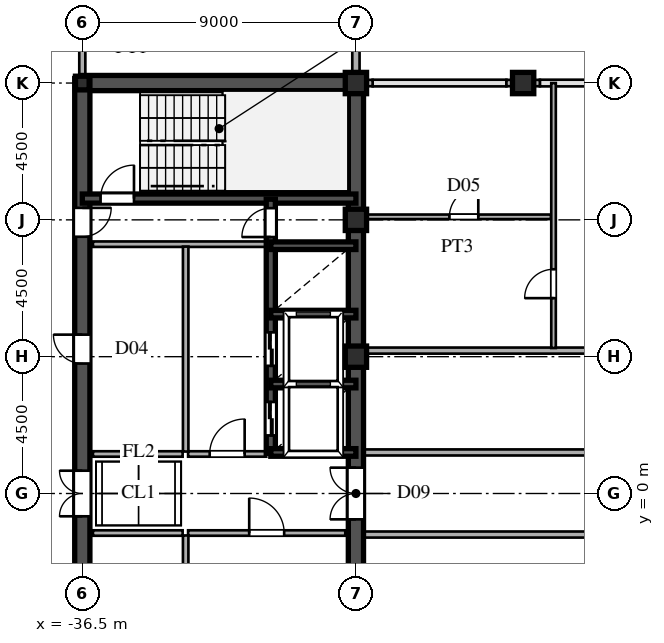
"""IFC4 building model, lengths in metres.
Left out: names, types, materials, properties, quantities, classifications, styles, units other than length and angle.
Written with IfcOpenShell. Run it as: python <this file> out.ifc"""

import sys

from ifc_helpers import new_model, si_unit, direction, frame, frame_2d, origin, origin_2d, place, context, subcontext, project, spatial, rectangle, hollow_rectangle, i_section, extrude, source, transform, mapped, element, fill, save


model = new_model("IFC4")
c1 = context("Model", 3, precision=1e-05, world=origin(), true_north=direction((0.0, 1.0)))
c2 = subcontext(c1, "Body", "Model", "MODEL_VIEW")
j1 = project(units=[si_unit("LENGTHUNIT", "METRE"), si_unit("PLANEANGLEUNIT", "RADIAN")], contexts=[c1])
p1 = place(None, origin())
s1 = spatial("IfcSite", under=j1, at=p1, CompositionType="ELEMENT")
p2 = place(p1, origin())
s2 = spatial("IfcBuilding", under=s1, at=p2, CompositionType="ELEMENT")
p3 = place(p2, frame((0.0, 0.0, 265.65)))
s3 = spatial("IfcBuildingStorey", under=s2, at=p3, CompositionType="ELEMENT", Elevation=265.65)
m1 = source(origin(), c2, "Body", "SweptSolid", [
    extrude(hollow_rectangle(XDim=0.7, YDim=0.7, WallThickness=0.03, at=origin_2d()), origin(), (0.0, 0.0, 1.0), 3.75),
])
for number, where, z_axis, x_axis in (
    (1, (-27.5, 4.5, 0.0), (0.0, 0.0, 1.0), (1.0, 0.0, 0.0)),
    (2, (-27.5, 9.0, 0.0), (0.0, 0.0, 1.0), (1.0, 0.0, 0.0)),
    (3, (-27.5, 13.5, 0.0), (0.0, 0.0, 1.0), (1.0, 0.0, 0.0)),
):
    element("IfcColumn", number, at=place(p3, frame(where, z_axis=z_axis, x_axis=x_axis)), inside=s3, PredefinedType="COLUMN", context=c2, shape_type="MappedRepresentation", body=[
        mapped(m1, transform((0.0, 0.0, 0.0), scale=1.0)),
    ])
m2 = source(origin(), c2, "Body", "SweptSolid", [
    extrude(i_section(OverallWidth=0.45, OverallDepth=0.45, WebThickness=0.016, FlangeThickness=0.025, at=origin_2d()), origin(), (0.0, 0.0, 1.0), 3.75),
])
p4 = place(p3, frame((-36.5, 13.5, 0.0), z_axis=(0.0, 0.0, 1.0), x_axis=(1.0, 0.0, 0.0)))
e4 = element("IfcColumn", 4, at=p4, inside=s3, PredefinedType="COLUMN", context=c2, shape_type="MappedRepresentation", body=[
    mapped(m2, transform((0.0, 0.0, 0.0), scale=1.0)),
])
p5 = place(p3, frame((-22.0, 13.5, 0.0), z_axis=(0.0, 0.0, 1.0), x_axis=(1.0, 0.0, 0.0)))
e5 = element("IfcColumn", 5, at=p5, inside=s3, PredefinedType="COLUMN", context=c2, shape_type="MappedRepresentation", body=[
    mapped(m1, transform((0.0, 0.0, 0.0), scale=1.0)),
])
p6 = place(p3, frame((-27.5, 13.755, 0.0), z_axis=(0.0, 0.0, 1.0), x_axis=(0.0, 1.0, 0.0)))
e6 = element("IfcWall", 6, at=p6, inside=s3, PredefinedType="SOLIDWALL", context=c2, shape_type="SweptSolid", body=[
    extrude(rectangle(XDim=0.62, YDim=0.24, at=frame_2d((0.31, 0.0))), origin(), (0.0, 0.0, 1.0), 2.99),
])
p7 = place(p3, frame((-27.5, 14.375, 0.0), z_axis=(0.0, 0.0, 1.0), x_axis=(0.0, 1.0, 0.0)))
e7 = element("IfcWall", 7, at=p7, inside=s3, PredefinedType="SOLIDWALL", context=c2, shape_type="SweptSolid", body=[
    extrude(rectangle(XDim=1.605, YDim=0.24, at=frame_2d((0.803, 0.0))), origin(), (0.0, 0.0, 1.0), 3.49),
])
p8 = place(p3, frame((-27.49, 13.5, 0.0), z_axis=(0.0, 0.0, 1.0), x_axis=(1.0, 0.0, 0.0)))
e8 = element("IfcWall", 8, at=p8, inside=s3, PredefinedType="SOLIDWALL", context=c2, shape_type="SweptSolid", body=[
    extrude(rectangle(XDim=0.54, YDim=0.21, at=frame_2d((0.27, 0.0))), origin(), (0.0, 0.0, 1.0), 2.99),
])
p9 = place(p3, frame((-22.55, 13.5, 0.0), z_axis=(0.0, 0.0, 1.0), x_axis=(1.0, 0.0, 0.0)))
e9 = element("IfcWall", 9, at=p9, inside=s3, PredefinedType="SOLIDWALL", context=c2, shape_type="SweptSolid", body=[
    extrude(rectangle(XDim=1.1, YDim=0.21, at=frame_2d((0.55, 0.0))), origin(), (0.0, 0.0, 1.0), 2.99),
])
for number, where, z_axis, x_axis in (
    (10, (-27.5, -13.5, 0.0), (0.0, 0.0, 1.0), (0.0, 1.0, 0.0)),
    (11, (-27.5, 1.3, 0.0), (0.0, 0.0, 1.0), (0.0, 1.0, 0.0)),
):
    element("IfcWall", number, at=place(p3, frame(where, z_axis=z_axis, x_axis=x_axis)), inside=s3, PredefinedType="SHEAR", context=c2, shape_type="SweptSolid", body=[
        extrude(rectangle(XDim=12.2, YDim=0.5, at=frame_2d((6.1, 0.0))), origin(), (0.0, 0.0, 1.0), 3.49),
    ])
p10 = place(p3, frame((-27.5, -1.3, 0.0), z_axis=(0.0, 0.0, 1.0), x_axis=(0.0, 1.0, 0.0)))
e12 = element("IfcWall", 12, at=p10, inside=s3, PredefinedType="SHEAR", context=c2, shape_type="SweptSolid", body=[
    extrude(rectangle(XDim=2.6, YDim=0.5, at=frame_2d((1.3, 0.0))), origin(), (0.0, 0.0, 1.0), 3.49),
])
p11 = place(p10, frame((0.45, 0.0, 0.0)))
e13 = element("IfcOpeningElement", 13, at=p11, cuts=e12, PredefinedType="OPENING", context=c2, shape_type="SweptSolid", body=[
    extrude(rectangle(XDim=1.7, YDim=2.35, at=frame_2d((0.85, 1.175))), frame((0.0, 0.26, 0.0), z_axis=(0.0, -1.0, 0.0), x_axis=(1.0, 0.0, 0.0)), (0.0, 0.0, 1.0), 0.52),
])
p12 = place(p3, frame((-36.5, 13.5, 0.0), z_axis=(0.0, 0.0, 1.0), x_axis=(1.0, 0.0, 0.0)))
e14 = element("IfcWall", 14, at=p12, inside=s3, PredefinedType="SHEAR", context=c2, shape_type="SweptSolid", body=[
    extrude(rectangle(XDim=9.0, YDim=0.5, at=frame_2d((4.5, 0.0))), origin(), (0.0, 0.0, 1.0), 3.49),
])
p13 = place(p3, frame((-36.5, -1.3, 0.0), z_axis=(0.0, 0.0, 1.0), x_axis=(0.0, 1.0, 0.0)))
e15 = element("IfcWall", 15, at=p13, inside=s3, PredefinedType="SHEAR", context=c2, shape_type="SweptSolid", body=[
    extrude(rectangle(XDim=2.6, YDim=0.5, at=frame_2d((1.3, 0.0))), origin(), (0.0, 0.0, 1.0), 3.49),
])
p14 = place(p13, frame((0.55, 0.0, 0.0)))
e16 = element("IfcOpeningElement", 16, at=p14, cuts=e15, PredefinedType="OPENING", context=c2, shape_type="SweptSolid", body=[
    extrude(rectangle(XDim=1.5, YDim=2.3, at=frame_2d((0.75, 1.15))), frame((0.0, 0.26, 0.0), z_axis=(0.0, -1.0, 0.0), x_axis=(1.0, 0.0, 0.0)), (0.0, 0.0, 1.0), 0.52),
])
p15 = place(p3, frame((-36.5, 8.2, 0.0), z_axis=(0.0, 0.0, 1.0), x_axis=(0.0, 1.0, 0.0)))
e17 = element("IfcWall", 17, at=p15, inside=s3, PredefinedType="SHEAR", context=c2, shape_type="SweptSolid", body=[
    extrude(rectangle(XDim=5.45, YDim=0.5, at=frame_2d((2.725, 0.0))), origin(), (0.0, 0.0, 1.0), 3.49),
])
p16 = place(p15, frame((0.245, 0.0, 0.0)))
e18 = element("IfcOpeningElement", 18, at=p16, cuts=e17, PredefinedType="OPENING", context=c2, shape_type="SweptSolid", body=[
    extrude(rectangle(XDim=0.95, YDim=2.15, at=frame_2d((0.475, 1.075))), frame((0.0, 0.26, 0.0), z_axis=(0.0, -1.0, 0.0), x_axis=(1.0, 0.0, 0.0)), (0.0, 0.0, 1.0), 0.52),
])
p17 = place(p3, frame((-36.5, -6.5, 0.0), z_axis=(0.0, 0.0, 1.0), x_axis=(0.0, 1.0, 0.0)))
e19 = element("IfcWall", 19, at=p17, inside=s3, PredefinedType="SHEAR", context=c2, shape_type="SweptSolid", body=[
    extrude(rectangle(XDim=5.2, YDim=0.5, at=frame_2d((2.6, 0.0))), origin(), (0.0, 0.0, 1.0), 3.49),
])
p18 = place(p17, frame((2.125, 0.0, 0.0)))
e20 = element("IfcOpeningElement", 20, at=p18, cuts=e19, PredefinedType="OPENING", context=c2, shape_type="SweptSolid", body=[
    extrude(rectangle(XDim=0.95, YDim=2.15, at=frame_2d((0.475, 1.075))), frame((0.0, 0.26, 0.0), z_axis=(0.0, -1.0, 0.0), x_axis=(1.0, 0.0, 0.0)), (0.0, 0.0, 1.0), 0.52),
])
p19 = place(p3, frame((-36.5, 1.3, 0.0), z_axis=(0.0, 0.0, 1.0), x_axis=(0.0, 1.0, 0.0)))
e21 = element("IfcWall", 21, at=p19, inside=s3, PredefinedType="SHEAR", context=c2, shape_type="SweptSolid", body=[
    extrude(rectangle(XDim=6.9, YDim=0.5, at=frame_2d((3.45, 0.0))), origin(), (0.0, 0.0, 1.0), 3.49),
])
p20 = place(p19, frame((2.975, 0.0, 0.0)))
e22 = element("IfcOpeningElement", 22, at=p20, cuts=e21, PredefinedType="OPENING", context=c2, shape_type="SweptSolid", body=[
    extrude(rectangle(XDim=0.95, YDim=2.15, at=frame_2d((0.475, 1.075))), frame((0.0, 0.26, 0.0), z_axis=(0.0, -1.0, 0.0), x_axis=(1.0, 0.0, 0.0)), (0.0, 0.0, 1.0), 0.52),
])
p21 = place(p3, frame((-36.5, 9.7, 0.0), z_axis=(0.0, 0.0, 1.0), x_axis=(1.0, 0.0, 0.0)))
e23 = element("IfcWall", 23, at=p21, inside=s3, PredefinedType="SHEAR", context=c2, shape_type="SweptSolid", body=[
    extrude(rectangle(XDim=9.0, YDim=0.3, at=frame_2d((4.5, 0.0))), origin(), (0.0, 0.0, 1.0), 3.49),
])
p22 = place(p21, frame((0.6, 0.0, 0.0)))
e24 = element("IfcOpeningElement", 24, at=p22, cuts=e23, PredefinedType="OPENING", context=c2, shape_type="SweptSolid", body=[
    extrude(rectangle(XDim=1.1, YDim=2.2, at=frame_2d((0.55, 1.1))), frame((0.0, 0.16, 0.0), z_axis=(0.0, -1.0, 0.0), x_axis=(1.0, 0.0, 0.0)), (0.0, 0.0, 1.0), 0.32),
])
for number, where, z_axis, x_axis in (
    (25, (-30.3, 1.35, 0.0), (0.0, 0.0, 1.0), (1.0, 0.0, 0.0)),
    (26, (-30.3, 3.6, 0.0), (0.0, 0.0, 1.0), (1.0, 0.0, 0.0)),
    (27, (-30.3, 5.9, 0.0), (0.0, 0.0, 1.0), (1.0, 0.0, 0.0)),
    (28, (-30.3, 8.15, 0.0), (0.0, 0.0, 1.0), (1.0, 0.0, 0.0)),
):
    element("IfcWall", number, at=place(p3, frame(where, z_axis=z_axis, x_axis=x_axis)), inside=s3, PredefinedType="SHEAR", context=c2, shape_type="SweptSolid", body=[
        extrude(rectangle(XDim=2.8, YDim=0.25, at=frame_2d((1.4, 0.0))), origin(), (0.0, 0.0, 1.0), 3.49),
    ])
p23 = place(p3, frame((-30.3, 1.32, 0.0), z_axis=(0.0, 0.0, 1.0), x_axis=(0.0, 1.0, 0.0)))
e29 = element("IfcWall", 29, at=p23, inside=s3, PredefinedType="SHEAR", context=c2, shape_type="SweptSolid", body=[
    extrude(rectangle(XDim=2.28, YDim=0.3, at=frame_2d((1.14, 0.0))), origin(), (0.0, 0.0, 1.0), 3.49),
])
p24 = place(p23, frame((0.59, 0.0, 0.0)))
e30 = element("IfcOpeningElement", 30, at=p24, cuts=e29, PredefinedType="OPENING", context=c2, shape_type="SweptSolid", body=[
    extrude(rectangle(XDim=1.1, YDim=2.2, at=frame_2d((0.55, 1.1))), frame((0.0, 0.16, 0.0), z_axis=(0.0, -1.0, 0.0), x_axis=(1.0, 0.0, 0.0)), (0.0, 0.0, 1.0), 0.32),
])
p25 = place(p3, frame((-30.3, 3.6, 0.0), z_axis=(0.0, 0.0, 1.0), x_axis=(0.0, 1.0, 0.0)))
e31 = element("IfcWall", 31, at=p25, inside=s3, PredefinedType="SHEAR", context=c2, shape_type="SweptSolid", body=[
    extrude(rectangle(XDim=2.3, YDim=0.3, at=frame_2d((1.15, 0.0))), origin(), (0.0, 0.0, 1.0), 3.49),
])
p26 = place(p25, frame((0.6, 0.0, 0.0)))
e32 = element("IfcOpeningElement", 32, at=p26, cuts=e31, PredefinedType="OPENING", context=c2, shape_type="SweptSolid", body=[
    extrude(rectangle(XDim=1.1, YDim=2.2, at=frame_2d((0.55, 1.1))), frame((0.0, 0.16, 0.0), z_axis=(0.0, -1.0, 0.0), x_axis=(1.0, 0.0, 0.0)), (0.0, 0.0, 1.0), 0.32),
])
p27 = place(p3, frame((-30.3, 5.9, 0.0), z_axis=(0.0, 0.0, 1.0), x_axis=(0.0, 1.0, 0.0)))
e33 = element("IfcWall", 33, at=p27, inside=s3, PredefinedType="SHEAR", context=c2, shape_type="SweptSolid", body=[
    extrude(rectangle(XDim=2.25, YDim=0.3, at=frame_2d((1.125, 0.0))), origin(), (0.0, 0.0, 1.0), 3.49),
])
p28 = place(p3, frame((-30.3, 8.15, 0.0), z_axis=(0.0, 0.0, 1.0), x_axis=(0.0, 1.0, 0.0)))
e34 = element("IfcWall", 34, at=p28, inside=s3, PredefinedType="SHEAR", context=c2, shape_type="SweptSolid", body=[
    extrude(rectangle(XDim=1.53, YDim=0.3, at=frame_2d((0.765, 0.0))), origin(), (0.0, 0.0, 1.0), 3.49),
])
p29 = place(p28, frame((0.285, 0.0, 0.0)))
e35 = element("IfcOpeningElement", 35, at=p29, cuts=e34, PredefinedType="OPENING", context=c2, shape_type="SweptSolid", body=[
    extrude(rectangle(XDim=0.95, YDim=2.15, at=frame_2d((0.475, 1.075))), frame((0.0, 0.16, 0.0), z_axis=(0.0, -1.0, 0.0), x_axis=(1.0, 0.0, 0.0)), (0.0, 0.0, 1.0), 0.32),
])
p30 = place(p3, frame((-36.15, 8.2, 0.0), z_axis=(0.0, 0.0, 1.0), x_axis=(1.0, 0.0, 0.0)))
e36 = element("IfcWall", 36, at=p30, inside=s3, PredefinedType="PARTITIONING", context=c2, shape_type="SweptSolid", body=[
    extrude(rectangle(XDim=5.7, YDim=0.18, at=frame_2d((2.85, 0.0))), origin(), (0.0, 0.0, 1.0), 3.49),
])
p31 = place(p3, frame((-33.1, -6.42, 0.0), z_axis=(0.0, 0.0, 1.0), x_axis=(0.0, 1.0, 0.0)))
e37 = element("IfcWall", 37, at=p31, inside=s3, PredefinedType="PARTITIONING", context=c2, shape_type="SweptSolid", body=[
    extrude(rectangle(XDim=5.04, YDim=0.18, at=frame_2d((2.52, 0.0))), origin(), (0.0, 0.0, 1.0), 3.49),
])
p32 = place(p3, frame((-33.1, 1.38, 0.0), z_axis=(0.0, 0.0, 1.0), x_axis=(0.0, 1.0, 0.0)))
e38 = element("IfcWall", 38, at=p32, inside=s3, PredefinedType="PARTITIONING", context=c2, shape_type="SweptSolid", body=[
    extrude(rectangle(XDim=6.74, YDim=0.18, at=frame_2d((3.37, 0.0))), origin(), (0.0, 0.0, 1.0), 3.49),
])
p33 = place(p3, frame((-33.02, -1.3, 0.0), z_axis=(0.0, 0.0, 1.0), x_axis=(1.0, 0.0, 0.0)))
e39 = element("IfcWall", 39, at=p33, inside=s3, PredefinedType="PARTITIONING", context=c2, shape_type="SweptSolid", body=[
    extrude(rectangle(XDim=5.17, YDim=0.18, at=frame_2d((2.585, 0.0))), origin(), (0.0, 0.0, 1.0), 3.49),
])
p34 = place(p33, frame((2.01, 0.0, 0.0)))
e40 = element("IfcOpeningElement", 40, at=p34, cuts=e39, PredefinedType="OPENING", context=c2, shape_type="SweptSolid", body=[
    extrude(rectangle(XDim=1.15, YDim=2.2, at=frame_2d((0.575, 1.1))), frame((0.0, 0.1, 0.0), z_axis=(0.0, -1.0, 0.0), x_axis=(1.0, 0.0, 0.0)), (0.0, 0.0, 1.0), 0.2),
])
p35 = place(p3, frame((-33.02, 1.3, 0.0), z_axis=(0.0, 0.0, 1.0), x_axis=(1.0, 0.0, 0.0)))
e41 = element("IfcWall", 41, at=p35, inside=s3, PredefinedType="PARTITIONING", context=c2, shape_type="SweptSolid", body=[
    extrude(rectangle(XDim=2.57, YDim=0.18, at=frame_2d((1.285, 0.0))), origin(), (0.0, 0.0, 1.0), 3.49),
])
p36 = place(p35, frame((0.71, 0.0, 0.0)))
e42 = element("IfcOpeningElement", 42, at=p36, cuts=e41, PredefinedType="OPENING", context=c2, shape_type="SweptSolid", body=[
    extrude(rectangle(XDim=1.15, YDim=2.2, at=frame_2d((0.575, 1.1))), frame((0.0, 0.1, 0.0), z_axis=(0.0, -1.0, 0.0), x_axis=(1.0, 0.0, 0.0)), (0.0, 0.0, 1.0), 0.2),
])
for number, where, z_axis, x_axis in (
    (43, (-36.15, -1.3, 0.0), (0.0, 0.0, 1.0), (1.0, 0.0, 0.0)),
    (44, (-36.15, 1.3, 0.0), (0.0, 0.0, 1.0), (1.0, 0.0, 0.0)),
):
    element("IfcWall", number, at=place(p3, frame(where, z_axis=z_axis, x_axis=x_axis)), inside=s3, PredefinedType="PARTITIONING", context=c2, shape_type="SweptSolid", body=[
        extrude(rectangle(XDim=2.95, YDim=0.18, at=frame_2d((1.475, 0.0))), origin(), (0.0, 0.0, 1.0), 3.49),
    ])
p37 = place(p3, frame((-27.245, -1.35, 0.0), z_axis=(0.0, 0.0, 1.0), x_axis=(1.0, 0.0, 0.0)))
e45 = element("IfcWall", 45, at=p37, inside=s3, PredefinedType="PARTITIONING", context=c2, shape_type="SweptSolid", body=[
    extrude(rectangle(XDim=20.36, YDim=0.2, at=frame_2d((10.18, 0.0))), origin(), (0.0, 0.0, 1.0), 3.49),
])
p38 = place(p37, frame((12.97, 0.0, 0.0)))
e46 = element("IfcOpeningElement", 46, at=p38, cuts=e45, PredefinedType="OPENING", context=c2, shape_type="SweptSolid", body=[
    extrude(rectangle(XDim=1.05, YDim=2.25, at=frame_2d((0.525, 1.125))), frame((0.0, 0.11, 0.0), z_axis=(0.0, -1.0, 0.0), x_axis=(1.0, 0.0, 0.0)), (0.0, 0.0, 1.0), 0.22),
])
p39 = place(p3, frame((-27.245, 1.35, 0.0), z_axis=(0.0, 0.0, 1.0), x_axis=(1.0, 0.0, 0.0)))
e47 = element("IfcWall", 47, at=p39, inside=s3, PredefinedType="PARTITIONING", context=c2, shape_type="SweptSolid", body=[
    extrude(rectangle(XDim=20.36, YDim=0.2, at=frame_2d((10.18, 0.0))), origin(), (0.0, 0.0, 1.0), 3.49),
])
p40 = place(p39, frame((12.97, 0.0, 0.0)))
e48 = element("IfcOpeningElement", 48, at=p40, cuts=e47, PredefinedType="OPENING", context=c2, shape_type="SweptSolid", body=[
    extrude(rectangle(XDim=1.05, YDim=2.25, at=frame_2d((0.525, 1.125))), frame((0.0, 0.11, 0.0), z_axis=(0.0, -1.0, 0.0), x_axis=(1.0, 0.0, 0.0)), (0.0, 0.0, 1.0), 0.22),
])
p41 = place(p3, frame((-27.245, 4.7, 0.0), z_axis=(0.0, 0.0, 1.0), x_axis=(1.0, 0.0, 0.0)))
e49 = element("IfcWall", 49, at=p41, inside=s3, PredefinedType="PARTITIONING", context=c2, shape_type="SweptSolid", body=[
    extrude(rectangle(XDim=54.49, YDim=0.2, at=frame_2d((27.245, 0.0))), origin(), (0.0, 0.0, 1.0), 3.49),
])
p42 = place(p41, frame((22.47, 0.0, 0.0)))
e50 = element("IfcOpeningElement", 50, at=p42, cuts=e49, PredefinedType="OPENING", context=c2, shape_type="SweptSolid", body=[
    extrude(rectangle(XDim=1.05, YDim=2.25, at=frame_2d((0.525, 1.125))), frame((0.0, 0.11, 0.0), z_axis=(0.0, -1.0, 0.0), x_axis=(1.0, 0.0, 0.0)), (0.0, 0.0, 1.0), 0.22),
])
p43 = place(p3, frame((-27.245, 9.1, 0.0), z_axis=(0.0, 0.0, 1.0), x_axis=(1.0, 0.0, 0.0)))
e51 = element("IfcWall", 51, at=p43, inside=s3, PredefinedType="PARTITIONING", context=c2, shape_type="SweptSolid", body=[
    extrude(rectangle(XDim=6.16, YDim=0.15, at=frame_2d((3.08, 0.0))), origin(), (0.0, 0.0, 1.0), 3.49),
])
p44 = place(p43, frame((2.82, 0.0, 0.0)))
e52 = element("IfcOpeningElement", 52, at=p44, cuts=e51, PredefinedType="OPENING", context=c2, shape_type="SweptSolid", body=[
    extrude(rectangle(XDim=0.95, YDim=2.15, at=frame_2d((0.475, 1.075))), frame((0.0, 0.085, 0.0), z_axis=(0.0, -1.0, 0.0), x_axis=(1.0, 0.0, 0.0)), (0.0, 0.0, 1.0), 0.17),
])
p45 = place(p3, frame((-36.5, 13.755, 0.0), z_axis=(0.0, 0.0, 1.0), x_axis=(0.0, 1.0, 0.0)))
e53 = element("IfcWall", 53, at=p45, inside=s3, PredefinedType="PARTITIONING", context=c2, shape_type="SweptSolid", body=[
    extrude(rectangle(XDim=1.76, YDim=0.2, at=frame_2d((0.88, 0.0))), origin(), (0.0, 0.0, 1.0), 2.89),
])
p46 = place(p3, frame((-21.0, 4.785, 0.0), z_axis=(0.0, 0.0, 1.0), x_axis=(0.0, 1.0, 0.0)))
e54 = element("IfcWall", 54, at=p46, inside=s3, PredefinedType="PARTITIONING", context=c2, shape_type="SweptSolid", body=[
    extrude(rectangle(XDim=8.715, YDim=0.15, at=frame_2d((4.357, 0.0))), origin(), (0.0, 0.0, 1.0), 3.49),
])
p47 = place(p46, frame((1.64, 0.0, 0.0)))
e55 = element("IfcOpeningElement", 55, at=p47, cuts=e54, PredefinedType="OPENING", context=c2, shape_type="SweptSolid", body=[
    extrude(rectangle(XDim=0.95, YDim=2.15, at=frame_2d((0.475, 1.075))), frame((0.0, 0.085, 0.0), z_axis=(0.0, -1.0, 0.0), x_axis=(1.0, 0.0, 0.0)), (0.0, 0.0, 1.0), 0.17),
])
m3 = source(origin(), c2, "Body", "SweptSolid", [
    extrude(rectangle(XDim=1.7, YDim=2.35, at=frame_2d((0.85, 1.175))), frame((0.0, 0.025, 0.0), z_axis=(0.0, -1.0, 0.0), x_axis=(1.0, 0.0, 0.0)), (0.0, 0.0, 1.0), 0.05),
])
p48 = place(p11, origin())
e56 = element("IfcDoor", 56, at=p48, inside=s3, OperationType="DOUBLE_SWING_LEFT", PredefinedType="DOOR", context=c2, shape_type="MappedRepresentation", body=[
    mapped(m3, transform((0.0, 0.0, 0.0), scale=1.0)),
])
fill(e13, e56)
m4 = source(origin(), c2, "Body", "SweptSolid", [
    extrude(rectangle(XDim=1.5, YDim=2.3, at=frame_2d((0.75, 1.15))), frame((0.0, 0.025, 0.0), z_axis=(0.0, -1.0, 0.0), x_axis=(1.0, 0.0, 0.0)), (0.0, 0.0, 1.0), 0.05),
])
p49 = place(p14, origin())
e57 = element("IfcDoor", 57, at=p49, inside=s3, OperationType="DOUBLE_SWING_LEFT", PredefinedType="DOOR", context=c2, shape_type="MappedRepresentation", body=[
    mapped(m4, transform((0.0, 0.0, 0.0), scale=1.0)),
])
fill(e16, e57)
m5 = source(origin(), c2, "Body", "SweptSolid", [
    extrude(rectangle(XDim=0.95, YDim=2.15, at=frame_2d((0.475, 1.075))), frame((0.0, 0.025, 0.0), z_axis=(0.0, -1.0, 0.0), x_axis=(1.0, 0.0, 0.0)), (0.0, 0.0, 1.0), 0.05),
])
p50 = place(p16, frame((0.95, 0.0, 0.0), z_axis=(0.0, 0.0, 1.0), x_axis=(-1.0, 0.0, 0.0)))
e58 = element("IfcDoor", 58, at=p50, inside=s3, OperationType="SINGLE_SWING_RIGHT", PredefinedType="DOOR", context=c2, shape_type="MappedRepresentation", body=[
    mapped(m5, transform((0.0, 0.0, 0.0), scale=1.0)),
])
fill(e18, e58)
p51 = place(p20, origin())
e59 = element("IfcDoor", 59, at=p51, inside=s3, OperationType="SINGLE_SWING_RIGHT", PredefinedType="DOOR", context=c2, shape_type="MappedRepresentation", body=[
    mapped(m5, transform((0.0, 0.0, 0.0), scale=1.0)),
])
fill(e22, e59)
m6 = source(origin(), c2, "Body", "SweptSolid", [
    extrude(rectangle(XDim=1.1, YDim=2.2, at=frame_2d((0.55, 1.1))), frame((0.0, 0.025, 0.0), z_axis=(0.0, -1.0, 0.0), x_axis=(1.0, 0.0, 0.0)), (0.0, 0.0, 1.0), 0.05),
])
p52 = place(p22, origin())
e60 = element("IfcDoor", 60, at=p52, inside=s3, OperationType="SINGLE_SWING_RIGHT", PredefinedType="DOOR", context=c2, shape_type="MappedRepresentation", body=[
    mapped(m6, transform((0.0, 0.0, 0.0), scale=1.0)),
])
fill(e24, e60)
m7 = source(origin(), c2, "Body", "SweptSolid", [
    extrude(rectangle(XDim=1.1, YDim=2.2, at=frame_2d((0.55, 1.1))), frame((0.0, 0.025, 0.0), z_axis=(0.0, -1.0, 0.0), x_axis=(1.0, 0.0, 0.0)), (0.0, 0.0, 1.0), 0.05),
])
p53 = place(p24, origin())
e61 = element("IfcDoor", 61, at=p53, inside=s3, OperationType="DOUBLE_DOOR_SLIDING", PredefinedType="DOOR", context=c2, shape_type="MappedRepresentation", body=[
    mapped(m7, transform((0.0, 0.0, 0.0), scale=1.0)),
])
fill(e30, e61)
p54 = place(p26, origin())
e62 = element("IfcDoor", 62, at=p54, inside=s3, OperationType="DOUBLE_DOOR_SLIDING", PredefinedType="DOOR", context=c2, shape_type="MappedRepresentation", body=[
    mapped(m7, transform((0.0, 0.0, 0.0), scale=1.0)),
])
fill(e32, e62)
p55 = place(p29, origin())
e63 = element("IfcDoor", 63, at=p55, inside=s3, OperationType="SINGLE_SWING_LEFT", PredefinedType="DOOR", context=c2, shape_type="MappedRepresentation", body=[
    mapped(m5, transform((0.0, 0.0, 0.0), scale=1.0)),
])
fill(e35, e63)
m8 = source(origin(), c2, "Body", "SweptSolid", [
    extrude(rectangle(XDim=1.15, YDim=2.2, at=frame_2d((0.575, 1.1))), frame((0.0, 0.025, 0.0), z_axis=(0.0, -1.0, 0.0), x_axis=(1.0, 0.0, 0.0)), (0.0, 0.0, 1.0), 0.05),
])
p56 = place(p34, origin())
e64 = element("IfcDoor", 64, at=p56, inside=s3, OperationType="SINGLE_SWING_LEFT", PredefinedType="DOOR", context=c2, shape_type="MappedRepresentation", body=[
    mapped(m8, transform((0.0, 0.0, 0.0), scale=1.0)),
])
fill(e40, e64)
p57 = place(p36, origin())
e65 = element("IfcDoor", 65, at=p57, inside=s3, OperationType="SINGLE_SWING_RIGHT", PredefinedType="DOOR", context=c2, shape_type="MappedRepresentation", body=[
    mapped(m8, transform((0.0, 0.0, 0.0), scale=1.0)),
])
fill(e42, e65)
m9 = source(origin(), c2, "Body", "SweptSolid", [
    extrude(rectangle(XDim=0.95, YDim=2.15, at=frame_2d((0.475, 1.075))), frame((0.0, 0.025, 0.0), z_axis=(0.0, -1.0, 0.0), x_axis=(1.0, 0.0, 0.0)), (0.0, 0.0, 1.0), 0.05),
])
p58 = place(p44, origin())
e66 = element("IfcDoor", 66, at=p58, inside=s3, OperationType="SINGLE_SWING_RIGHT", PredefinedType="DOOR", context=c2, shape_type="MappedRepresentation", body=[
    mapped(m9, transform((0.0, 0.0, 0.0), scale=1.0)),
])
fill(e52, e66)
p59 = place(p47, origin())
e67 = element("IfcDoor", 67, at=p59, inside=s3, OperationType="SINGLE_SWING_LEFT", PredefinedType="DOOR", context=c2, shape_type="MappedRepresentation", body=[
    mapped(m9, transform((0.0, 0.0, 0.0), scale=1.0)),
])
fill(e55, e67)
save(model, sys.argv[1])
